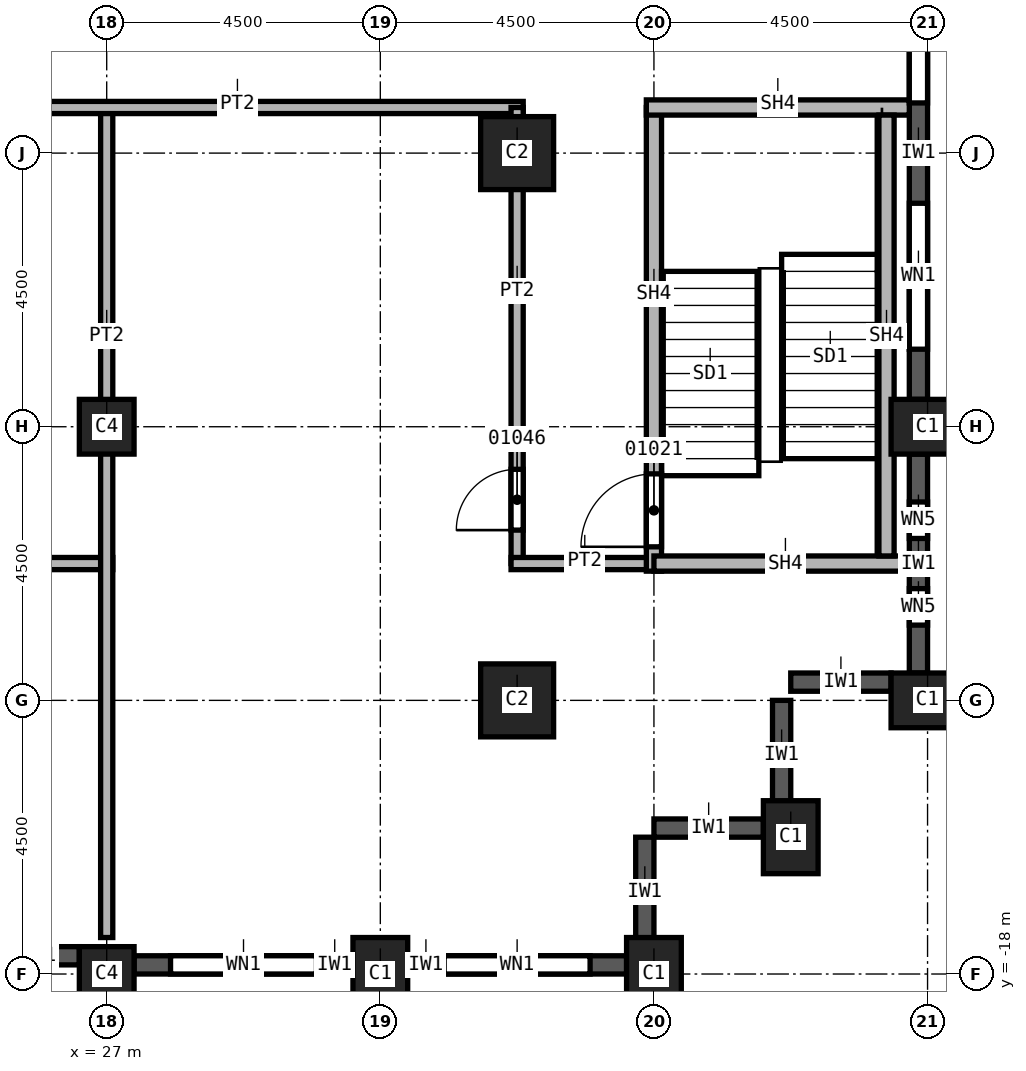
"""IFC4 building model, lengths in metres.
Left out: names, types, materials, properties, quantities, classifications, styles, units other than length and angle.
Written with IfcOpenShell. Run it as: python <this file> out.ifc"""

import sys

from ifc_helpers import new_model, si_unit, direction, frame, frame_2d, origin, origin_2d, place, context, subcontext, project, spatial, rectangle, extrude, element, fill, save


model = new_model("IFC4")
c1 = context("Model", 3, precision=1e-05, world=origin(), true_north=direction((0.0, 1.0)))
c2 = subcontext(c1, "Body", "Model", "MODEL_VIEW")
j1 = project(units=[si_unit("LENGTHUNIT", "METRE"), si_unit("PLANEANGLEUNIT", "RADIAN")], contexts=[c1])
p1 = place(None, origin())
s1 = spatial("IfcSite", under=j1, at=p1, CompositionType="ELEMENT")
p2 = place(p1, origin())
s2 = spatial("IfcBuilding", under=s1, at=p2, CompositionType="ELEMENT")
p3 = place(p2, frame((0.0, 0.0, 72.0)))
s3 = spatial("IfcBuildingStorey", under=s2, at=p3, CompositionType="ELEMENT", Elevation=72.0)
for number, where, z_axis, x_axis in (
    (1, (40.5, -9.0, 0.0), (0.0, 0.0, 1.0), (0.0, 1.0, 0.0)),
    (2, (40.5, -13.5, 0.0), (0.0, 0.0, 1.0), (0.0, 1.0, 0.0)),
    (3, (38.25, -15.75, 0.0), (0.0, 0.0, 1.0), (1.0, 0.0, 0.0)),
    (4, (31.5, -18.0, 0.0), (0.0, 0.0, 1.0), (1.0, 0.0, 0.0)),
    (5, (36.0, -18.0, 0.0), (0.0, 0.0, 1.0), (1.0, 0.0, 0.0)),
):
    element("IfcColumn", number, at=place(p3, frame(where, z_axis=z_axis, x_axis=x_axis)), inside=s3, PredefinedType="COLUMN", context=c2, shape_type="SweptSolid", body=[
        extrude(rectangle(XDim=0.9, YDim=1.2, at=origin_2d()), origin(), (0.0, 0.0, 1.0), 3.7),
    ])
for number, where, z_axis, x_axis in (
    (6, (33.75, -4.5, 0.0), (0.0, 0.0, 1.0), (1.0, 0.0, 0.0)),
    (7, (33.75, -13.5, 0.0), (0.0, 0.0, 1.0), (1.0, 0.0, 0.0)),
):
    element("IfcColumn", number, at=place(p3, frame(where, z_axis=z_axis, x_axis=x_axis)), inside=s3, PredefinedType="COLUMN", context=c2, shape_type="SweptSolid", body=[
        extrude(rectangle(XDim=1.2, YDim=1.2, at=origin_2d()), origin(), (0.0, 0.0, 1.0), 3.7),
    ])
for number, where, z_axis, x_axis in (
    (8, (27.0, -9.0, 0.0), (0.0, 0.0, 1.0), (1.0, 0.0, 0.0)),
    (9, (27.0, -18.0, 0.0), (0.0, 0.0, 1.0), (1.0, 0.0, 0.0)),
):
    element("IfcColumn", number, at=place(p3, frame(where, z_axis=z_axis, x_axis=x_axis)), inside=s3, PredefinedType="COLUMN", context=c2, shape_type="SweptSolid", body=[
        extrude(rectangle(XDim=0.9, YDim=0.9, at=origin_2d()), origin(), (0.0, 0.0, 1.0), 3.7),
    ])
for number, where, z_axis, x_axis in (
    (10, (35.85, -17.55, 0.0), (0.0, 0.0, 1.0), (0.0, 1.0, 0.0)),
    (11, (37.8, -15.6, 0.0), (0.0, 0.0, 1.0), (-1.0, 0.0, 0.0)),
    (12, (38.1, -15.3, 0.0), (0.0, 0.0, 1.0), (0.0, 1.0, 0.0)),
):
    element("IfcWall", number, at=place(p3, frame(where, z_axis=z_axis, x_axis=x_axis)), inside=s3, PredefinedType="SOLIDWALL", context=c2, shape_type="SweptSolid", body=[
        extrude(rectangle(XDim=1.8, YDim=0.3, at=frame_2d((0.9, 0.0))), origin(), (0.0, 0.0, 1.0), 3.1),
    ])
p4 = place(p3, frame((39.9, -13.2, 0.0), z_axis=(0.0, 0.0, 1.0), x_axis=(-1.0, 0.0, 0.0)))
e13 = element("IfcWall", 13, at=p4, inside=s3, PredefinedType="SOLIDWALL", context=c2, shape_type="SweptSolid", body=[
    extrude(rectangle(XDim=1.65, YDim=0.3, at=frame_2d((0.825, 0.0))), origin(), (0.0, 0.0, 1.0), 3.1),
])
p5 = place(p3, frame((25.2, -17.7, 0.0), z_axis=(0.0, 0.0, 1.0), x_axis=(1.0, 0.0, 0.0)))
e14 = element("IfcWall", 14, at=p5, inside=s3, PredefinedType="SOLIDWALL", context=c2, shape_type="SweptSolid", body=[
    extrude(rectangle(XDim=1.35, YDim=0.3, at=frame_2d((0.675, 0.0))), origin(), (0.0, 0.0, 1.0), 3.1),
])
p6 = place(p3, frame((27.45, -17.85, 0.0), z_axis=(0.0, 0.0, 1.0), x_axis=(1.0, 0.0, 0.0)))
e15 = element("IfcWall", 15, at=p6, inside=s3, PredefinedType="SOLIDWALL", context=c2, shape_type="SweptSolid", body=[
    extrude(rectangle(XDim=3.6, YDim=0.3, at=frame_2d((1.8, 0.0))), origin(), (0.0, 0.0, 1.0), 3.1),
])
p7 = place(p6, frame((0.6, 0.0, 0.8)))
e16 = element("IfcOpeningElement", 16, at=p7, cuts=e15, PredefinedType="OPENING", context=c2, shape_type="SweptSolid", body=[
    extrude(rectangle(XDim=2.4, YDim=1.95, at=frame_2d((1.2, 0.975))), frame((0.0, 0.15, 0.0), z_axis=(0.0, -1.0, 0.0), x_axis=(1.0, 0.0, 0.0)), (0.0, 0.0, 1.0), 0.3),
])
p8 = place(p3, frame((31.95, -17.85, 0.0), z_axis=(0.0, 0.0, 1.0), x_axis=(1.0, 0.0, 0.0)))
e17 = element("IfcWall", 17, at=p8, inside=s3, PredefinedType="SOLIDWALL", context=c2, shape_type="SweptSolid", body=[
    extrude(rectangle(XDim=3.6, YDim=0.3, at=frame_2d((1.8, 0.0))), origin(), (0.0, 0.0, 1.0), 3.1),
])
p9 = place(p8, frame((0.6, 0.0, 0.8)))
e18 = element("IfcOpeningElement", 18, at=p9, cuts=e17, PredefinedType="OPENING", context=c2, shape_type="SweptSolid", body=[
    extrude(rectangle(XDim=2.4, YDim=1.95, at=frame_2d((1.2, 0.975))), frame((0.0, 0.15, 0.0), z_axis=(0.0, -1.0, 0.0), x_axis=(1.0, 0.0, 0.0)), (0.0, 0.0, 1.0), 0.3),
])
p10 = place(p3, frame((40.35, -13.05, 0.0), z_axis=(0.0, 0.0, 1.0), x_axis=(0.0, 1.0, 0.0)))
e19 = element("IfcWall", 19, at=p10, inside=s3, PredefinedType="SOLIDWALL", context=c2, shape_type="SweptSolid", body=[
    extrude(rectangle(XDim=3.6, YDim=0.3, at=frame_2d((1.8, 0.0))), origin(), (0.0, 0.0, 1.0), 3.1),
])
p11 = place(p10, frame((0.788, 0.0, 0.8)))
e20 = element("IfcOpeningElement", 20, at=p11, cuts=e19, PredefinedType="OPENING", context=c2, shape_type="SweptSolid", body=[
    extrude(rectangle(XDim=0.6, YDim=1.95, at=frame_2d((0.3, 0.975))), frame((0.0, 0.15, 0.0), z_axis=(0.0, -1.0, 0.0), x_axis=(1.0, 0.0, 0.0)), (0.0, 0.0, 1.0), 0.3),
])
p12 = place(p10, frame((2.212, 0.0, 0.8)))
e21 = element("IfcOpeningElement", 21, at=p12, cuts=e19, PredefinedType="OPENING", context=c2, shape_type="SweptSolid", body=[
    extrude(rectangle(XDim=0.6, YDim=1.95, at=frame_2d((0.3, 0.975))), frame((0.0, 0.15, 0.0), z_axis=(0.0, -1.0, 0.0), x_axis=(1.0, 0.0, 0.0)), (0.0, 0.0, 1.0), 0.3),
])
p13 = place(p3, frame((40.35, -8.55, 0.0), z_axis=(0.0, 0.0, 1.0), x_axis=(0.0, 1.0, 0.0)))
e22 = element("IfcWall", 22, at=p13, inside=s3, PredefinedType="SOLIDWALL", context=c2, shape_type="SweptSolid", body=[
    extrude(rectangle(XDim=8.1, YDim=0.3, at=frame_2d((4.05, 0.0))), origin(), (0.0, 0.0, 1.0), 3.1),
])
p14 = place(p13, frame((0.825, 0.0, 0.8)))
e23 = element("IfcOpeningElement", 23, at=p14, cuts=e22, PredefinedType="OPENING", context=c2, shape_type="SweptSolid", body=[
    extrude(rectangle(XDim=2.4, YDim=1.95, at=frame_2d((1.2, 0.975))), frame((0.0, 0.15, 0.0), z_axis=(0.0, -1.0, 0.0), x_axis=(1.0, 0.0, 0.0)), (0.0, 0.0, 1.0), 0.3),
])
p15 = place(p13, frame((4.875, 0.0, 0.8)))
e24 = element("IfcOpeningElement", 24, at=p15, cuts=e22, PredefinedType="OPENING", context=c2, shape_type="SweptSolid", body=[
    extrude(rectangle(XDim=2.4, YDim=1.95, at=frame_2d((1.2, 0.975))), frame((0.0, 0.15, 0.0), z_axis=(0.0, -1.0, 0.0), x_axis=(1.0, 0.0, 0.0)), (0.0, 0.0, 1.0), 0.3),
])
p16 = place(p3, frame((15.4, -11.25, 0.0), z_axis=(0.0, 0.0, 1.0), x_axis=(1.0, 0.0, 0.0)))
e25 = element("IfcWall", 25, at=p16, inside=s3, PredefinedType="PARTITIONING", context=c2, shape_type="SweptSolid", body=[
    extrude(rectangle(XDim=11.7, YDim=0.2, at=frame_2d((5.85, 0.0))), origin(), (0.0, 0.0, 1.0), 3.7),
])
p17 = place(p3, frame((27.0, -3.75, 0.0), z_axis=(0.0, 0.0, 1.0), x_axis=(0.0, -1.0, 0.0)))
e26 = element("IfcWall", 26, at=p17, inside=s3, PredefinedType="PARTITIONING", context=c2, shape_type="SweptSolid", body=[
    extrude(rectangle(XDim=13.65, YDim=0.2, at=frame_2d((6.825, 0.0))), origin(), (0.0, 0.0, 1.0), 3.7),
])
p18 = place(p3, frame((33.85, -3.75, 0.0), z_axis=(0.0, 0.0, 1.0), x_axis=(-1.0, 0.0, 0.0)))
e27 = element("IfcWall", 27, at=p18, inside=s3, PredefinedType="PARTITIONING", context=c2, shape_type="SweptSolid", body=[
    extrude(rectangle(XDim=18.45, YDim=0.2, at=frame_2d((9.225, 0.0))), origin(), (0.0, 0.0, 1.0), 3.7),
])
p19 = place(p18, frame((9.4, 0.0, 0.0)))
e28 = element("IfcOpeningElement", 28, at=p19, cuts=e27, PredefinedType="OPENING", context=c2, shape_type="SweptSolid", body=[
    extrude(rectangle(XDim=1.0, YDim=2.1, at=frame_2d((0.5, 1.05))), frame((0.0, 0.1, 0.0), z_axis=(0.0, -1.0, 0.0), x_axis=(1.0, 0.0, 0.0)), (0.0, 0.0, 1.0), 0.2),
])
p20 = place(p3, frame((33.75, -11.25, 0.0), z_axis=(0.0, 0.0, 1.0), x_axis=(0.0, 1.0, 0.0)))
e29 = element("IfcWall", 29, at=p20, inside=s3, PredefinedType="PARTITIONING", context=c2, shape_type="SweptSolid", body=[
    extrude(rectangle(XDim=7.5, YDim=0.2, at=frame_2d((3.75, 0.0))), origin(), (0.0, 0.0, 1.0), 3.7),
])
p21 = place(p20, frame((0.55, 0.0, 0.0)))
e30 = element("IfcOpeningElement", 30, at=p21, cuts=e29, PredefinedType="OPENING", context=c2, shape_type="SweptSolid", body=[
    extrude(rectangle(XDim=1.0, YDim=2.1, at=frame_2d((0.5, 1.05))), frame((0.0, 0.1, 0.0), z_axis=(0.0, -1.0, 0.0), x_axis=(1.0, 0.0, 0.0)), (0.0, 0.0, 1.0), 0.2),
])
p22 = place(p3, frame((36.0, -11.25, 0.0), z_axis=(0.0, 0.0, 1.0), x_axis=(-1.0, 0.0, 0.0)))
e31 = element("IfcWall", 31, at=p22, inside=s3, PredefinedType="PARTITIONING", context=c2, shape_type="SweptSolid", body=[
    extrude(rectangle(XDim=2.35, YDim=0.2, at=frame_2d((1.175, 0.0))), origin(), (0.0, 0.0, 1.0), 3.7),
])
p23 = place(p3, frame((36.0, -11.375, 0.0), z_axis=(0.0, 0.0, 1.0), x_axis=(0.0, 1.0, 0.0)))
e32 = element("IfcWall", 32, at=p23, inside=s3, PredefinedType="SOLIDWALL", context=c2, shape_type="SweptSolid", body=[
    extrude(rectangle(XDim=7.625, YDim=0.25, at=frame_2d((3.812, 0.0))), origin(), (0.0, 0.0, 1.0), 3.7),
])
p24 = place(p23, frame((0.4, 0.0, 0.0)))
e33 = element("IfcOpeningElement", 33, at=p24, cuts=e32, PredefinedType="OPENING", context=c2, shape_type="SweptSolid", body=[
    extrude(rectangle(XDim=1.2, YDim=2.1, at=frame_2d((0.6, 1.05))), frame((0.0, 0.125, 0.0), z_axis=(0.0, -1.0, 0.0), x_axis=(1.0, 0.0, 0.0)), (0.0, 0.0, 1.0), 0.25),
])
p25 = place(p3, frame((40.2, -11.25, 0.0), z_axis=(0.0, 0.0, 1.0), x_axis=(-1.0, 0.0, 0.0)))
e34 = element("IfcWall", 34, at=p25, inside=s3, PredefinedType="SOLIDWALL", context=c2, shape_type="SweptSolid", body=[
    extrude(rectangle(XDim=4.2, YDim=0.25, at=frame_2d((2.1, 0.0))), origin(), (0.0, 0.0, 1.0), 3.7),
])
p26 = place(p3, frame((40.2, -3.75, 0.0), z_axis=(0.0, 0.0, 1.0), x_axis=(-1.0, 0.0, 0.0)))
e35 = element("IfcWall", 35, at=p26, inside=s3, PredefinedType="SOLIDWALL", context=c2, shape_type="SweptSolid", body=[
    extrude(rectangle(XDim=4.325, YDim=0.25, at=frame_2d((2.163, 0.0))), origin(), (0.0, 0.0, 1.0), 3.7),
])
p27 = place(p3, frame((39.825, -11.125, 0.0), z_axis=(0.0, 0.0, 1.0), x_axis=(0.0, 1.0, 0.0)))
e36 = element("IfcWall", 36, at=p27, inside=s3, PredefinedType="SOLIDWALL", context=c2, shape_type="SweptSolid", body=[
    extrude(rectangle(XDim=7.25, YDim=0.25, at=frame_2d((3.625, 0.0))), origin(), (0.0, 0.0, 1.0), 3.7),
])
p28 = place(p7, origin())
e37 = element("IfcWindow", 37, at=p28, inside=s3, PartitioningType="SINGLE_PANEL", PredefinedType="WINDOW", context=c2, shape_type="SweptSolid", body=[
    extrude(rectangle(XDim=2.4, YDim=1.95, at=frame_2d((1.2, 0.975))), frame((0.0, 0.03, 0.0), z_axis=(0.0, -1.0, 0.0), x_axis=(1.0, 0.0, 0.0)), (0.0, 0.0, 1.0), 0.06),
])
fill(e16, e37)
p29 = place(p9, origin())
e38 = element("IfcWindow", 38, at=p29, inside=s3, PartitioningType="SINGLE_PANEL", PredefinedType="WINDOW", context=c2, shape_type="SweptSolid", body=[
    extrude(rectangle(XDim=2.4, YDim=1.95, at=frame_2d((1.2, 0.975))), frame((0.0, 0.03, 0.0), z_axis=(0.0, -1.0, 0.0), x_axis=(1.0, 0.0, 0.0)), (0.0, 0.0, 1.0), 0.06),
])
fill(e18, e38)
p30 = place(p14, origin())
e39 = element("IfcWindow", 39, at=p30, inside=s3, PartitioningType="SINGLE_PANEL", PredefinedType="WINDOW", context=c2, shape_type="SweptSolid", body=[
    extrude(rectangle(XDim=2.4, YDim=1.95, at=frame_2d((1.2, 0.975))), frame((0.0, 0.03, 0.0), z_axis=(0.0, -1.0, 0.0), x_axis=(1.0, 0.0, 0.0)), (0.0, 0.0, 1.0), 0.06),
])
fill(e23, e39)
p31 = place(p15, origin())
e40 = element("IfcWindow", 40, at=p31, inside=s3, PartitioningType="SINGLE_PANEL", PredefinedType="WINDOW", context=c2, shape_type="SweptSolid", body=[
    extrude(rectangle(XDim=2.4, YDim=1.95, at=frame_2d((1.2, 0.975))), frame((0.0, 0.03, 0.0), z_axis=(0.0, -1.0, 0.0), x_axis=(1.0, 0.0, 0.0)), (0.0, 0.0, 1.0), 0.06),
])
fill(e24, e40)
p32 = place(p24, origin())
e41 = element("IfcDoor", 41, at=p32, inside=s3, OperationType="SINGLE_SWING_RIGHT", PredefinedType="DOOR", context=c2, shape_type="SweptSolid", body=[
    extrude(rectangle(XDim=1.2, YDim=2.1, at=frame_2d((0.6, 1.05))), frame((0.0, 0.025, 0.0), z_axis=(0.0, -1.0, 0.0), x_axis=(1.0, 0.0, 0.0)), (0.0, 0.0, 1.0), 0.05),
])
fill(e33, e41)
p33 = place(p21, origin())
e42 = element("IfcDoor", 42, at=p33, inside=s3, OperationType="SINGLE_SWING_LEFT", PredefinedType="DOOR", context=c2, shape_type="SweptSolid", body=[
    extrude(rectangle(XDim=1.0, YDim=2.1, at=frame_2d((0.5, 1.05))), frame((0.0, 0.025, 0.0), z_axis=(0.0, -1.0, 0.0), x_axis=(1.0, 0.0, 0.0)), (0.0, 0.0, 1.0), 0.05),
])
fill(e30, e42)
p34 = place(p11, origin())
e43 = element("IfcWindow", 43, at=p34, inside=s3, PartitioningType="SINGLE_PANEL", PredefinedType="WINDOW", context=c2, shape_type="SweptSolid", body=[
    extrude(rectangle(XDim=0.6, YDim=1.95, at=frame_2d((0.3, 0.975))), frame((0.0, 0.03, 0.0), z_axis=(0.0, -1.0, 0.0), x_axis=(1.0, 0.0, 0.0)), (0.0, 0.0, 1.0), 0.06),
])
fill(e20, e43)
p35 = place(p12, origin())
e44 = element("IfcWindow", 44, at=p35, inside=s3, PartitioningType="SINGLE_PANEL", PredefinedType="WINDOW", context=c2, shape_type="SweptSolid", body=[
    extrude(rectangle(XDim=0.6, YDim=1.95, at=frame_2d((0.3, 0.975))), frame((0.0, 0.03, 0.0), z_axis=(0.0, -1.0, 0.0), x_axis=(1.0, 0.0, 0.0)), (0.0, 0.0, 1.0), 0.06),
])
fill(e21, e44)
save(model, sys.argv[1])
